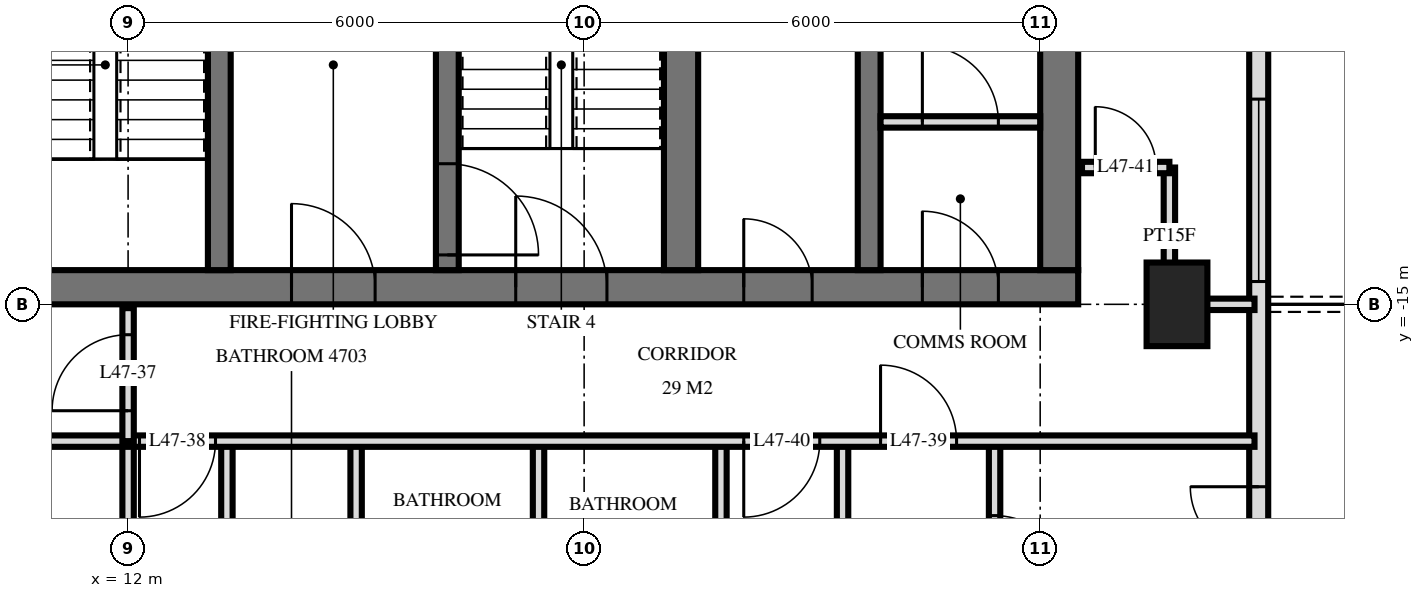
"""IFC4 building model, lengths in metres.
Left out: names, types, materials, properties, quantities, classifications, styles, units other than length and angle.
Written with IfcOpenShell. Run it as: python <this file> out.ifc"""

import sys

from ifc_helpers import new_model, si_unit, direction, frame, frame_2d, origin, origin_2d, place, context, subcontext, project, spatial, rectangle, extrude, element, fill, save


model = new_model("IFC4")
c1 = context("Model", 3, precision=1e-05, world=origin(), true_north=direction((0.0, 1.0)))
c2 = subcontext(c1, "Body", "Model", "MODEL_VIEW")
j1 = project(units=[si_unit("LENGTHUNIT", "METRE"), si_unit("PLANEANGLEUNIT", "RADIAN")], contexts=[c1])
p1 = place(None, origin())
s1 = spatial("IfcSite", under=j1, at=p1, CompositionType="ELEMENT")
p2 = place(p1, origin())
s2 = spatial("IfcBuilding", under=s1, at=p2, CompositionType="ELEMENT")
p3 = place(p2, frame((0.0, 0.0, 183.6)))
s3 = spatial("IfcBuildingStorey", under=s2, at=p3, CompositionType="ELEMENT", Elevation=183.6)
p4 = place(p3, frame((25.8, -15.0, -0.28), z_axis=(0.0, 0.0, 1.0), x_axis=(0.0, 1.0, 0.0)))
e1 = element("IfcColumn", 1, at=p4, inside=s3, PredefinedType="COLUMN", context=c2, shape_type="SweptSolid", body=[
    extrude(rectangle(XDim=1.1, YDim=0.8, at=origin_2d()), origin(), (0.0, 0.0, 1.0), 3.78),
])
p5 = place(p3, frame((10.0, -14.775, 0.0), z_axis=(0.0, 0.0, 1.0), x_axis=(1.0, 0.0, 0.0)))
e2 = element("IfcWall", 2, at=p5, inside=s3, PredefinedType="SHEAR", context=c2, shape_type="SweptSolid", body=[
    extrude(rectangle(XDim=14.5, YDim=0.45, at=frame_2d((7.25, 0.0))), origin(), (0.0, 0.0, 1.0), 3.5),
])
p6 = place(p5, frame((7.1, 0.0, 0.0)))
e3 = element("IfcOpeningElement", 3, at=p6, cuts=e2, PredefinedType="OPENING", context=c2, shape_type="SweptSolid", body=[
    extrude(rectangle(XDim=1.2, YDim=2.1, at=frame_2d((0.6, 1.05))), frame((0.0, 0.235, 0.0), z_axis=(0.0, -1.0, 0.0), x_axis=(1.0, 0.0, 0.0)), (0.0, 0.0, 1.0), 0.47),
])
p7 = place(p5, frame((4.15, 0.0, 0.0)))
e4 = element("IfcOpeningElement", 4, at=p7, cuts=e2, PredefinedType="OPENING", context=c2, shape_type="SweptSolid", body=[
    extrude(rectangle(XDim=1.1, YDim=2.1, at=frame_2d((0.55, 1.05))), frame((0.0, 0.235, 0.0), z_axis=(0.0, -1.0, 0.0), x_axis=(1.0, 0.0, 0.0)), (0.0, 0.0, 1.0), 0.47),
])
p8 = place(p5, frame((10.1, 0.0, 0.0)))
e5 = element("IfcOpeningElement", 5, at=p8, cuts=e2, PredefinedType="OPENING", context=c2, shape_type="SweptSolid", body=[
    extrude(rectangle(XDim=0.9, YDim=2.1, at=frame_2d((0.45, 1.05))), frame((0.0, 0.235, 0.0), z_axis=(0.0, -1.0, 0.0), x_axis=(1.0, 0.0, 0.0)), (0.0, 0.0, 1.0), 0.47),
])
p9 = place(p5, frame((12.45, 0.0, 0.0)))
e6 = element("IfcOpeningElement", 6, at=p9, cuts=e2, PredefinedType="OPENING", context=c2, shape_type="SweptSolid", body=[
    extrude(rectangle(XDim=1.0, YDim=2.1, at=frame_2d((0.5, 1.05))), frame((0.0, 0.235, 0.0), z_axis=(0.0, -1.0, 0.0), x_axis=(1.0, 0.0, 0.0)), (0.0, 0.0, 1.0), 0.47),
])
p10 = place(p3, frame((24.25, -14.55, 0.0), z_axis=(0.0, 0.0, 1.0), x_axis=(0.0, 1.0, 0.0)))
e7 = element("IfcWall", 7, at=p10, inside=s3, PredefinedType="SHEAR", context=c2, shape_type="SweptSolid", body=[
    extrude(rectangle(XDim=14.1, YDim=0.5, at=frame_2d((7.05, 0.0))), origin(), (0.0, 0.0, 1.0), 3.5),
])
p11 = place(p3, frame((13.2, -14.55, 0.0), z_axis=(0.0, 0.0, 1.0), x_axis=(0.0, 1.0, 0.0)))
e8 = element("IfcWall", 8, at=p11, inside=s3, PredefinedType="SHEAR", context=c2, shape_type="SweptSolid", body=[
    extrude(rectangle(XDim=5.4, YDim=0.3, at=frame_2d((2.7, 0.0))), origin(), (0.0, 0.0, 1.0), 3.5),
])
p12 = place(p11, frame((4.0, 0.0, 0.0)))
e9 = element("IfcOpeningElement", 9, at=p12, cuts=e8, PredefinedType="OPENING", context=c2, shape_type="SweptSolid", body=[
    extrude(rectangle(XDim=1.2, YDim=2.1, at=frame_2d((0.6, 1.05))), frame((0.0, 0.16, 0.0), z_axis=(0.0, -1.0, 0.0), x_axis=(1.0, 0.0, 0.0)), (0.0, 0.0, 1.0), 0.32),
])
p13 = place(p3, frame((16.2, -14.55, 0.0), z_axis=(0.0, 0.0, 1.0), x_axis=(0.0, 1.0, 0.0)))
e10 = element("IfcWall", 10, at=p13, inside=s3, PredefinedType="SHEAR", context=c2, shape_type="SweptSolid", body=[
    extrude(rectangle(XDim=5.4, YDim=0.3, at=frame_2d((2.7, 0.0))), origin(), (0.0, 0.0, 1.0), 3.5),
])
p14 = place(p13, frame((0.2, 0.0, 0.0)))
e11 = element("IfcOpeningElement", 11, at=p14, cuts=e10, PredefinedType="OPENING", context=c2, shape_type="SweptSolid", body=[
    extrude(rectangle(XDim=1.2, YDim=2.1, at=frame_2d((0.6, 1.05))), frame((0.0, 0.16, 0.0), z_axis=(0.0, -1.0, 0.0), x_axis=(1.0, 0.0, 0.0)), (0.0, 0.0, 1.0), 0.32),
])
p15 = place(p3, frame((19.275, -14.55, 0.0), z_axis=(0.0, 0.0, 1.0), x_axis=(0.0, 1.0, 0.0)))
e12 = element("IfcWall", 12, at=p15, inside=s3, PredefinedType="SHEAR", context=c2, shape_type="SweptSolid", body=[
    extrude(rectangle(XDim=5.4, YDim=0.45, at=frame_2d((2.7, 0.0))), origin(), (0.0, 0.0, 1.0), 3.5),
])
p16 = place(p3, frame((21.75, -14.55, 0.0), z_axis=(0.0, 0.0, 1.0), x_axis=(0.0, 1.0, 0.0)))
e13 = element("IfcWall", 13, at=p16, inside=s3, PredefinedType="SHEAR", context=c2, shape_type="SweptSolid", body=[
    extrude(rectangle(XDim=5.4, YDim=0.3, at=frame_2d((2.7, 0.0))), origin(), (0.0, 0.0, 1.0), 3.5),
])
p17 = place(p3, frame((26.875, -24.875, 0.0), z_axis=(0.0, 0.0, 1.0), x_axis=(0.0, 1.0, 0.0)))
e14 = element("IfcWall", 14, at=p17, inside=s3, PredefinedType="SOLIDWALL", context=c2, shape_type="SweptSolid", body=[
    extrude(rectangle(XDim=21.551, YDim=0.25, at=frame_2d((10.775, 0.0))), origin(), (0.0, 0.0, 1.0), 3.22),
])
p18 = place(p17, frame((0.575, 0.0, 0.0)))
e15 = element("IfcOpeningElement", 15, at=p18, cuts=e14, PredefinedType="OPENING", context=c2, shape_type="SweptSolid", body=[
    extrude(rectangle(XDim=1.8, YDim=2.4, at=frame_2d((0.9, 1.2))), frame((0.0, 0.135, 0.0), z_axis=(0.0, -1.0, 0.0), x_axis=(1.0, 0.0, 0.0)), (0.0, 0.0, 1.0), 0.27),
])
p19 = place(p17, frame((5.675, 0.0, 0.0)))
e16 = element("IfcOpeningElement", 16, at=p19, cuts=e14, PredefinedType="OPENING", context=c2, shape_type="SweptSolid", body=[
    extrude(rectangle(XDim=1.8, YDim=2.4, at=frame_2d((0.9, 1.2))), frame((0.0, 0.135, 0.0), z_axis=(0.0, -1.0, 0.0), x_axis=(1.0, 0.0, 0.0)), (0.0, 0.0, 1.0), 0.27),
])
p20 = place(p17, frame((10.175, 0.0, 0.9)))
e17 = element("IfcOpeningElement", 17, at=p20, cuts=e14, PredefinedType="OPENING", context=c2, shape_type="SweptSolid", body=[
    extrude(rectangle(XDim=2.4, YDim=1.5, at=frame_2d((1.2, 0.75))), frame((0.0, 0.135, 0.0), z_axis=(0.0, -1.0, 0.0), x_axis=(1.0, 0.0, 0.0)), (0.0, 0.0, 1.0), 0.27),
])
p21 = place(p17, frame((13.475, 0.0, 0.0)))
e18 = element("IfcOpeningElement", 18, at=p21, cuts=e14, PredefinedType="OPENING", context=c2, shape_type="SweptSolid", body=[
    extrude(rectangle(XDim=1.8, YDim=2.4, at=frame_2d((0.9, 1.2))), frame((0.0, 0.135, 0.0), z_axis=(0.0, -1.0, 0.0), x_axis=(1.0, 0.0, 0.0)), (0.0, 0.0, 1.0), 0.27),
])
p22 = place(p3, frame((21.9, -12.6, 0.0), z_axis=(0.0, 0.0, 1.0), x_axis=(1.0, 0.0, 0.0)))
e19 = element("IfcWall", 19, at=p22, inside=s3, PredefinedType="PARTITIONING", context=c2, shape_type="SweptSolid", body=[
    extrude(rectangle(XDim=2.1, YDim=0.15, at=frame_2d((1.05, 0.0))), origin(), (0.0, 0.0, 1.0), 3.2),
])
p23 = place(p22, frame((0.55, 0.0, 0.0)))
e20 = element("IfcOpeningElement", 20, at=p23, cuts=e19, PredefinedType="OPENING", context=c2, shape_type="SweptSolid", body=[
    extrude(rectangle(XDim=1.0, YDim=2.1, at=frame_2d((0.5, 1.05))), frame((0.0, 0.085, 0.0), z_axis=(0.0, -1.0, 0.0), x_axis=(1.0, 0.0, 0.0)), (0.0, 0.0, 1.0), 0.17),
])
p24 = place(p3, frame((25.7, -15.0, 0.0), z_axis=(0.0, 0.0, 1.0), x_axis=(0.0, 1.0, 0.0)))
e21 = element("IfcWall", 21, at=p24, inside=s3, PredefinedType="PARTITIONING", context=c2, shape_type="SweptSolid", body=[
    extrude(rectangle(XDim=1.8, YDim=0.15, at=frame_2d((0.9, 0.0))), origin(), (0.0, 0.0, 1.0), 3.22),
])
p25 = place(p3, frame((23.4, -19.8, 0.0), z_axis=(0.0, 0.0, 1.0), x_axis=(0.0, 1.0, 0.0)))
e22 = element("IfcWall", 22, at=p25, inside=s3, PredefinedType="PARTITIONING", context=c2, shape_type="SweptSolid", body=[
    extrude(rectangle(XDim=3.0, YDim=0.15, at=frame_2d((1.5, 0.0))), origin(), (0.0, 0.0, 1.0), 3.22),
])
p26 = place(p25, frame((1.02, 0.0, 0.0)))
e23 = element("IfcOpeningElement", 23, at=p26, cuts=e22, PredefinedType="OPENING", context=c2, shape_type="SweptSolid", body=[
    extrude(rectangle(XDim=1.0, YDim=2.1, at=frame_2d((0.5, 1.05))), frame((0.0, 0.085, 0.0), z_axis=(0.0, -1.0, 0.0), x_axis=(1.0, 0.0, 0.0)), (0.0, 0.0, 1.0), 0.17),
])
for number, where, z_axis, x_axis in (
    (24, (21.4, -19.8, 0.0), (0.0, 0.0, 1.0), (0.0, 1.0, 0.0)),
    (25, (19.8, -19.8, 0.0), (0.0, 0.0, 1.0), (0.0, 1.0, 0.0)),
    (26, (17.4, -19.8, 0.0), (0.0, 0.0, 1.0), (0.0, 1.0, 0.0)),
):
    element("IfcWall", number, at=place(p3, frame(where, z_axis=z_axis, x_axis=x_axis)), inside=s3, PredefinedType="PARTITIONING", context=c2, shape_type="SweptSolid", body=[
        extrude(rectangle(XDim=3.0, YDim=0.15, at=frame_2d((1.5, 0.0))), origin(), (0.0, 0.0, 1.0), 3.22),
    ])
p27 = place(p3, frame((15.0, -29.22, 0.0), z_axis=(0.0, 0.0, 1.0), x_axis=(0.0, 1.0, 0.0)))
e27 = element("IfcWall", 27, at=p27, inside=s3, PredefinedType="PARTITIONING", context=c2, shape_type="SweptSolid", body=[
    extrude(rectangle(XDim=12.42, YDim=0.15, at=frame_2d((6.21, 0.0))), origin(), (0.0, 0.0, 1.0), 3.22),
])
p28 = place(p3, frame((13.3, -19.8, 0.0), z_axis=(0.0, 0.0, 1.0), x_axis=(0.0, 1.0, 0.0)))
e28 = element("IfcWall", 28, at=p28, inside=s3, PredefinedType="PARTITIONING", context=c2, shape_type="SweptSolid", body=[
    extrude(rectangle(XDim=3.0, YDim=0.15, at=frame_2d((1.5, 0.0))), origin(), (0.0, 0.0, 1.0), 3.22),
])
p29 = place(p28, frame((1.1, 0.0, 0.0)))
e29 = element("IfcOpeningElement", 29, at=p29, cuts=e28, PredefinedType="OPENING", context=c2, shape_type="SweptSolid", body=[
    extrude(rectangle(XDim=0.8, YDim=2.1, at=frame_2d((0.4, 1.05))), frame((0.0, 0.085, 0.0), z_axis=(0.0, -1.0, 0.0), x_axis=(1.0, 0.0, 0.0)), (0.0, 0.0, 1.0), 0.17),
])
p30 = place(p3, frame((12.0, -16.8, 0.0), z_axis=(0.0, 0.0, 1.0), x_axis=(0.0, 1.0, 0.0)))
e30 = element("IfcWall", 30, at=p30, inside=s3, PredefinedType="PARTITIONING", context=c2, shape_type="SweptSolid", body=[
    extrude(rectangle(XDim=1.75, YDim=0.15, at=frame_2d((0.875, 0.0))), origin(), (0.0, 0.0, 1.0), 3.22),
])
p31 = place(p30, frame((0.4, 0.0, 0.0)))
e31 = element("IfcOpeningElement", 31, at=p31, cuts=e30, PredefinedType="OPENING", context=c2, shape_type="SweptSolid", body=[
    extrude(rectangle(XDim=1.0, YDim=2.1, at=frame_2d((0.5, 1.05))), frame((0.0, 0.085, 0.0), z_axis=(0.0, -1.0, 0.0), x_axis=(1.0, 0.0, 0.0)), (0.0, 0.0, 1.0), 0.17),
])
p32 = place(p3, frame((12.0, -29.22, 0.0), z_axis=(0.0, 0.0, 1.0), x_axis=(0.0, 1.0, 0.0)))
e32 = element("IfcWall", 32, at=p32, inside=s3, PredefinedType="PARTITIONING", context=c2, shape_type="SweptSolid", body=[
    extrude(rectangle(XDim=12.42, YDim=0.15, at=frame_2d((6.21, 0.0))), origin(), (0.0, 0.0, 1.0), 3.22),
])
p33 = place(p3, frame((-26.82, -16.8, 0.0), z_axis=(0.0, 0.0, 1.0), x_axis=(1.0, 0.0, 0.0)))
e33 = element("IfcWall", 33, at=p33, inside=s3, PredefinedType="PARTITIONING", context=c2, shape_type="SweptSolid", body=[
    extrude(rectangle(XDim=53.64, YDim=0.15, at=frame_2d((26.82, 0.0))), origin(), (0.0, 0.0, 1.0), 3.22),
])
p34 = place(p33, frame((11.97, 0.0, 0.0)))
e34 = element("IfcOpeningElement", 34, at=p34, cuts=e33, PredefinedType="OPENING", context=c2, shape_type="SweptSolid", body=[
    extrude(rectangle(XDim=1.0, YDim=2.1, at=frame_2d((0.5, 1.05))), frame((0.0, 0.085, 0.0), z_axis=(0.0, -1.0, 0.0), x_axis=(1.0, 0.0, 0.0)), (0.0, 0.0, 1.0), 0.17),
])
p35 = place(p33, frame((10.67, 0.0, 0.0)))
e35 = element("IfcOpeningElement", 35, at=p35, cuts=e33, PredefinedType="OPENING", context=c2, shape_type="SweptSolid", body=[
    extrude(rectangle(XDim=1.0, YDim=2.1, at=frame_2d((0.5, 1.05))), frame((0.0, 0.085, 0.0), z_axis=(0.0, -1.0, 0.0), x_axis=(1.0, 0.0, 0.0)), (0.0, 0.0, 1.0), 0.17),
])
p36 = place(p33, frame((3.22, 0.0, 0.0)))
e36 = element("IfcOpeningElement", 36, at=p36, cuts=e33, PredefinedType="OPENING", context=c2, shape_type="SweptSolid", body=[
    extrude(rectangle(XDim=1.0, YDim=2.1, at=frame_2d((0.5, 1.05))), frame((0.0, 0.085, 0.0), z_axis=(0.0, -1.0, 0.0), x_axis=(1.0, 0.0, 0.0)), (0.0, 0.0, 1.0), 0.17),
])
p37 = place(p33, frame((5.02, 0.0, 0.0)))
e37 = element("IfcOpeningElement", 37, at=p37, cuts=e33, PredefinedType="OPENING", context=c2, shape_type="SweptSolid", body=[
    extrude(rectangle(XDim=1.0, YDim=2.1, at=frame_2d((0.5, 1.05))), frame((0.0, 0.085, 0.0), z_axis=(0.0, -1.0, 0.0), x_axis=(1.0, 0.0, 0.0)), (0.0, 0.0, 1.0), 0.17),
])
p38 = place(p33, frame((38.97, 0.0, 0.0)))
e38 = element("IfcOpeningElement", 38, at=p38, cuts=e33, PredefinedType="OPENING", context=c2, shape_type="SweptSolid", body=[
    extrude(rectangle(XDim=1.0, YDim=2.1, at=frame_2d((0.5, 1.05))), frame((0.0, 0.085, 0.0), z_axis=(0.0, -1.0, 0.0), x_axis=(1.0, 0.0, 0.0)), (0.0, 0.0, 1.0), 0.17),
])
p39 = place(p33, frame((48.72, 0.0, 0.0)))
e39 = element("IfcOpeningElement", 39, at=p39, cuts=e33, PredefinedType="OPENING", context=c2, shape_type="SweptSolid", body=[
    extrude(rectangle(XDim=1.0, YDim=2.1, at=frame_2d((0.5, 1.05))), frame((0.0, 0.085, 0.0), z_axis=(0.0, -1.0, 0.0), x_axis=(1.0, 0.0, 0.0)), (0.0, 0.0, 1.0), 0.17),
])
p40 = place(p33, frame((46.92, 0.0, 0.0)))
e40 = element("IfcOpeningElement", 40, at=p40, cuts=e33, PredefinedType="OPENING", context=c2, shape_type="SweptSolid", body=[
    extrude(rectangle(XDim=1.0, YDim=2.1, at=frame_2d((0.5, 1.05))), frame((0.0, 0.085, 0.0), z_axis=(0.0, -1.0, 0.0), x_axis=(1.0, 0.0, 0.0)), (0.0, 0.0, 1.0), 0.17),
])
p41 = place(p33, frame((18.32, 0.0, 0.0)))
e41 = element("IfcOpeningElement", 41, at=p41, cuts=e33, PredefinedType="OPENING", context=c2, shape_type="SweptSolid", body=[
    extrude(rectangle(XDim=1.0, YDim=2.1, at=frame_2d((0.5, 1.05))), frame((0.0, 0.085, 0.0), z_axis=(0.0, -1.0, 0.0), x_axis=(1.0, 0.0, 0.0)), (0.0, 0.0, 1.0), 0.17),
])
p42 = place(p33, frame((26.32, 0.0, 0.0)))
e42 = element("IfcOpeningElement", 42, at=p42, cuts=e33, PredefinedType="OPENING", context=c2, shape_type="SweptSolid", body=[
    extrude(rectangle(XDim=1.0, YDim=2.1, at=frame_2d((0.5, 1.05))), frame((0.0, 0.085, 0.0), z_axis=(0.0, -1.0, 0.0), x_axis=(1.0, 0.0, 0.0)), (0.0, 0.0, 1.0), 0.17),
])
p43 = place(p33, frame((34.32, 0.0, 0.0)))
e43 = element("IfcOpeningElement", 43, at=p43, cuts=e33, PredefinedType="OPENING", context=c2, shape_type="SweptSolid", body=[
    extrude(rectangle(XDim=1.0, YDim=2.1, at=frame_2d((0.5, 1.05))), frame((0.0, 0.085, 0.0), z_axis=(0.0, -1.0, 0.0), x_axis=(1.0, 0.0, 0.0)), (0.0, 0.0, 1.0), 0.17),
])
p44 = place(p3, frame((25.7, -15.0, 0.0), z_axis=(0.0, 0.0, 1.0), x_axis=(1.0, 0.0, 0.0)))
e44 = element("IfcWall", 44, at=p44, inside=s3, PredefinedType="PARTITIONING", context=c2, shape_type="SweptSolid", body=[
    extrude(rectangle(XDim=1.12, YDim=0.15, at=frame_2d((0.56, 0.0))), origin(), (0.0, 0.0, 1.0), 3.22),
])
p45 = place(p3, frame((24.55, -13.2, 0.0), z_axis=(0.0, 0.0, 1.0), x_axis=(1.0, 0.0, 0.0)))
e45 = element("IfcWall", 45, at=p45, inside=s3, PredefinedType="PARTITIONING", context=c2, shape_type="SweptSolid", body=[
    extrude(rectangle(XDim=1.15, YDim=0.15, at=frame_2d((0.575, 0.0))), origin(), (0.0, 0.0, 1.0), 3.22),
])
p46 = place(p45, frame((0.175, 0.0, 0.0)))
e46 = element("IfcOpeningElement", 46, at=p46, cuts=e45, PredefinedType="OPENING", context=c2, shape_type="SweptSolid", body=[
    extrude(rectangle(XDim=0.8, YDim=2.1, at=frame_2d((0.4, 1.05))), frame((0.0, 0.085, 0.0), z_axis=(0.0, -1.0, 0.0), x_axis=(1.0, 0.0, 0.0)), (0.0, 0.0, 1.0), 0.17),
])
p47 = place(p19, origin())
e47 = element("IfcDoor", 47, at=p47, inside=s3, OperationType="DOUBLE_DOOR_SINGLE_SWING", PredefinedType="DOOR", context=c2, shape_type="SweptSolid", body=[
    extrude(rectangle(XDim=1.8, YDim=2.4, at=frame_2d((0.9, 1.2))), frame((0.0, 0.025, 0.0), z_axis=(0.0, -1.0, 0.0), x_axis=(1.0, 0.0, 0.0)), (0.0, 0.0, 1.0), 0.05),
])
fill(e16, e47)
p48 = place(p20, origin())
e48 = element("IfcWindow", 48, at=p48, inside=s3, PartitioningType="SINGLE_PANEL", PredefinedType="WINDOW", context=c2, shape_type="SweptSolid", body=[
    extrude(rectangle(XDim=2.4, YDim=1.5, at=frame_2d((1.2, 0.75))), frame((0.0, 0.03, 0.0), z_axis=(0.0, -1.0, 0.0), x_axis=(1.0, 0.0, 0.0)), (0.0, 0.0, 1.0), 0.06),
])
fill(e17, e48)
p49 = place(p6, origin())
e49 = element("IfcDoor", 49, at=p49, inside=s3, OperationType="SINGLE_SWING_RIGHT", PredefinedType="DOOR", context=c2, shape_type="SweptSolid", body=[
    extrude(rectangle(XDim=1.2, YDim=2.1, at=frame_2d((0.6, 1.05))), frame((0.0, 0.025, 0.0), z_axis=(0.0, -1.0, 0.0), x_axis=(1.0, 0.0, 0.0)), (0.0, 0.0, 1.0), 0.05),
])
fill(e3, e49)
p50 = place(p7, origin())
e50 = element("IfcDoor", 50, at=p50, inside=s3, OperationType="SINGLE_SWING_RIGHT", PredefinedType="DOOR", context=c2, shape_type="SweptSolid", body=[
    extrude(rectangle(XDim=1.1, YDim=2.1, at=frame_2d((0.55, 1.05))), frame((0.0, 0.025, 0.0), z_axis=(0.0, -1.0, 0.0), x_axis=(1.0, 0.0, 0.0)), (0.0, 0.0, 1.0), 0.05),
])
fill(e4, e50)
p51 = place(p8, origin())
e51 = element("IfcDoor", 51, at=p51, inside=s3, OperationType="SINGLE_SWING_RIGHT", PredefinedType="DOOR", context=c2, shape_type="SweptSolid", body=[
    extrude(rectangle(XDim=0.9, YDim=2.1, at=frame_2d((0.45, 1.05))), frame((0.0, 0.025, 0.0), z_axis=(0.0, -1.0, 0.0), x_axis=(1.0, 0.0, 0.0)), (0.0, 0.0, 1.0), 0.05),
])
fill(e5, e51)
p52 = place(p9, origin())
e52 = element("IfcDoor", 52, at=p52, inside=s3, OperationType="SINGLE_SWING_RIGHT", PredefinedType="DOOR", context=c2, shape_type="SweptSolid", body=[
    extrude(rectangle(XDim=1.0, YDim=2.1, at=frame_2d((0.5, 1.05))), frame((0.0, 0.025, 0.0), z_axis=(0.0, -1.0, 0.0), x_axis=(1.0, 0.0, 0.0)), (0.0, 0.0, 1.0), 0.05),
])
fill(e6, e52)
p53 = place(p14, frame((0.6, 0.0, 0.0), z_axis=(0.0, 0.0, 1.0), x_axis=(-1.0, 0.0, 0.0)))
e53 = element("IfcDoor", 53, at=p53, inside=s3, OperationType="SINGLE_SWING_LEFT", PredefinedType="DOOR", context=c2, shape_type="SweptSolid", body=[
    extrude(rectangle(XDim=1.2, YDim=2.1, at=frame_2d((0.0, 1.05))), frame((0.0, -0.025, 0.0), z_axis=(0.0, 1.0, 0.0), x_axis=(-1.0, 0.0, 0.0)), (0.0, 0.0, 1.0), 0.05),
])
fill(e11, e53)
p54 = place(p23, origin())
e54 = element("IfcDoor", 54, at=p54, inside=s3, OperationType="SINGLE_SWING_RIGHT", PredefinedType="DOOR", context=c2, shape_type="SweptSolid", body=[
    extrude(rectangle(XDim=1.0, YDim=2.1, at=frame_2d((0.5, 1.05))), frame((0.0, 0.025, 0.0), z_axis=(0.0, -1.0, 0.0), x_axis=(1.0, 0.0, 0.0)), (0.0, 0.0, 1.0), 0.05),
])
fill(e20, e54)
p55 = place(p31, origin())
e55 = element("IfcDoor", 55, at=p55, inside=s3, OperationType="SINGLE_SWING_RIGHT", PredefinedType="DOOR", context=c2, shape_type="SweptSolid", body=[
    extrude(rectangle(XDim=1.0, YDim=2.1, at=frame_2d((0.5, 1.05))), frame((0.0, 0.025, 0.0), z_axis=(0.0, -1.0, 0.0), x_axis=(1.0, 0.0, 0.0)), (0.0, 0.0, 1.0), 0.05),
])
fill(e31, e55)
p56 = place(p38, frame((0.5, 0.0, 0.0), z_axis=(0.0, 0.0, 1.0), x_axis=(-1.0, 0.0, 0.0)))
e56 = element("IfcDoor", 56, at=p56, inside=s3, OperationType="SINGLE_SWING_LEFT", PredefinedType="DOOR", context=c2, shape_type="SweptSolid", body=[
    extrude(rectangle(XDim=1.0, YDim=2.1, at=frame_2d((0.0, 1.05))), frame((0.0, -0.025, 0.0), z_axis=(0.0, 1.0, 0.0), x_axis=(-1.0, 0.0, 0.0)), (0.0, 0.0, 1.0), 0.05),
])
fill(e38, e56)
p57 = place(p39, origin())
e57 = element("IfcDoor", 57, at=p57, inside=s3, OperationType="SINGLE_SWING_RIGHT", PredefinedType="DOOR", context=c2, shape_type="SweptSolid", body=[
    extrude(rectangle(XDim=1.0, YDim=2.1, at=frame_2d((0.5, 1.05))), frame((0.0, 0.025, 0.0), z_axis=(0.0, -1.0, 0.0), x_axis=(1.0, 0.0, 0.0)), (0.0, 0.0, 1.0), 0.05),
])
fill(e39, e57)
p58 = place(p40, frame((0.5, 0.0, 0.0), z_axis=(0.0, 0.0, 1.0), x_axis=(-1.0, 0.0, 0.0)))
e58 = element("IfcDoor", 58, at=p58, inside=s3, OperationType="SINGLE_SWING_LEFT", PredefinedType="DOOR", context=c2, shape_type="SweptSolid", body=[
    extrude(rectangle(XDim=1.0, YDim=2.1, at=frame_2d((0.0, 1.05))), frame((0.0, -0.025, 0.0), z_axis=(0.0, 1.0, 0.0), x_axis=(-1.0, 0.0, 0.0)), (0.0, 0.0, 1.0), 0.05),
])
fill(e40, e58)
p59 = place(p46, origin())
e59 = element("IfcDoor", 59, at=p59, inside=s3, OperationType="SINGLE_SWING_RIGHT", PredefinedType="DOOR", context=c2, shape_type="SweptSolid", body=[
    extrude(rectangle(XDim=0.8, YDim=2.1, at=frame_2d((0.4, 1.05))), frame((0.0, 0.025, 0.0), z_axis=(0.0, -1.0, 0.0), x_axis=(1.0, 0.0, 0.0)), (0.0, 0.0, 1.0), 0.05),
])
fill(e46, e59)
p60 = place(p26, frame((0.5, 0.0, 0.0), z_axis=(0.0, 0.0, 1.0), x_axis=(-1.0, 0.0, 0.0)))
e60 = element("IfcDoor", 60, at=p60, inside=s3, OperationType="SINGLE_SWING_LEFT", PredefinedType="DOOR", context=c2, shape_type="SweptSolid", body=[
    extrude(rectangle(XDim=1.0, YDim=2.1, at=frame_2d((0.0, 1.05))), frame((0.0, -0.025, 0.0), z_axis=(0.0, 1.0, 0.0), x_axis=(-1.0, 0.0, 0.0)), (0.0, 0.0, 1.0), 0.05),
])
fill(e23, e60)
save(model, sys.argv[1])
